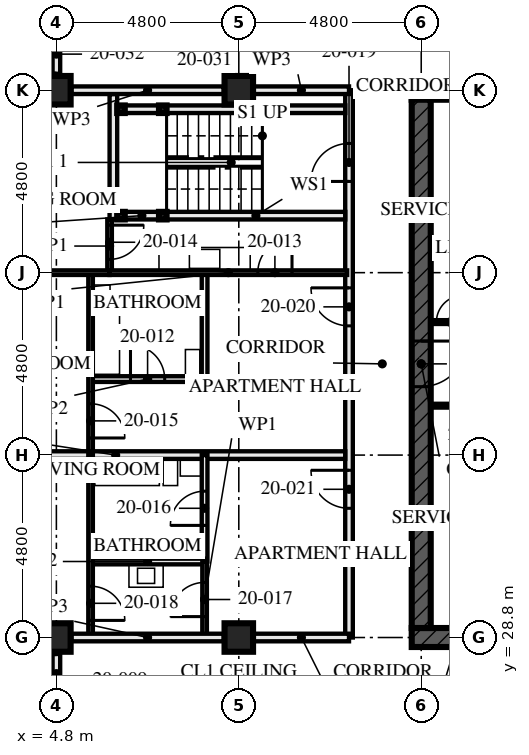
"""IFC4 building model, lengths in metres.
Left out: names, types, materials, properties, quantities, classifications, styles, units other than length and angle.
Written with IfcOpenShell. Run it as: python <this file> out.ifc"""

import sys

from ifc_helpers import new_model, si_unit, direction, frame, frame_2d, origin, origin_2d, place, context, subcontext, project, spatial, rectangle, hollow_rectangle, extrude, element, fill, save


model = new_model("IFC4")
c1 = context("Model", 3, precision=1e-05, world=origin(), true_north=direction((0.0, 1.0)))
c2 = subcontext(c1, "Body", "Model", "MODEL_VIEW")
j1 = project(units=[si_unit("LENGTHUNIT", "METRE"), si_unit("PLANEANGLEUNIT", "RADIAN")], contexts=[c1])
p1 = place(None, origin())
s1 = spatial("IfcSite", under=j1, at=p1, CompositionType="ELEMENT")
p2 = place(p1, origin())
s2 = spatial("IfcBuilding", under=s1, at=p2, CompositionType="ELEMENT")
p3 = place(p2, frame((0.0, 0.0, 76.0)))
s3 = spatial("IfcBuildingStorey", under=s2, at=p3, CompositionType="ELEMENT", Elevation=76.0)
for number, where, z_axis, x_axis in (
    (1, (4.8, 28.8, 0.0), (0.0, 0.0, 1.0), (0.0, 1.0, 0.0)),
    (2, (4.8, 43.2, 0.0), (0.0, 0.0, 1.0), (0.0, 1.0, 0.0)),
    (3, (9.6, 28.8, 0.0), (0.0, 0.0, 1.0), (0.0, 1.0, 0.0)),
    (4, (9.6, 43.2, 0.0), (0.0, 0.0, 1.0), (0.0, 1.0, 0.0)),
):
    element("IfcColumn", number, at=place(p3, frame(where, z_axis=z_axis, x_axis=x_axis)), inside=s3, PredefinedType="COLUMN", context=c2, shape_type="SweptSolid", body=[
        extrude(hollow_rectangle(XDim=0.75, YDim=0.75, WallThickness=0.08, at=origin_2d()), origin(), (0.0, 0.0, 1.0), 3.5),
    ])
p4 = place(p3, frame((14.15, 28.8, -0.17), z_axis=(0.0, 0.0, 1.0), x_axis=(1.0, 0.0, 0.0)))
e5 = element("IfcWall", 5, at=p4, inside=s3, PredefinedType="SHEAR", context=c2, shape_type="SweptSolid", body=[
    extrude(rectangle(XDim=14.9, YDim=0.5, at=frame_2d((7.45, 0.0))), origin(), (0.0, 0.0, 1.0), 3.42),
])
p5 = place(p4, frame((6.85, 0.0, 0.17)))
e6 = element("IfcOpeningElement", 6, at=p5, cuts=e5, PredefinedType="OPENING", context=c2, shape_type="SweptSolid", body=[
    extrude(rectangle(XDim=1.2, YDim=2.1, at=frame_2d((0.6, 1.05))), frame((0.0, 0.26, 0.0), z_axis=(0.0, -1.0, 0.0), x_axis=(1.0, 0.0, 0.0)), (0.0, 0.0, 1.0), 0.521),
])
p6 = place(p3, frame((29.05, 43.2, -0.17), z_axis=(0.0, 0.0, 1.0), x_axis=(-1.0, 0.0, 0.0)))
e7 = element("IfcWall", 7, at=p6, inside=s3, PredefinedType="SHEAR", context=c2, shape_type="SweptSolid", body=[
    extrude(rectangle(XDim=14.9, YDim=0.5, at=frame_2d((7.45, 0.0))), origin(), (0.0, 0.0, 1.0), 3.42),
])
p7 = place(p6, frame((6.85, 0.0, 0.17)))
e8 = element("IfcOpeningElement", 8, at=p7, cuts=e7, PredefinedType="OPENING", context=c2, shape_type="SweptSolid", body=[
    extrude(rectangle(XDim=1.2, YDim=2.1, at=frame_2d((0.6, 1.05))), frame((0.0, 0.26, 0.0), z_axis=(0.0, -1.0, 0.0), x_axis=(1.0, 0.0, 0.0)), (0.0, 0.0, 1.0), 0.521),
])
p8 = place(p3, frame((14.4, 42.95, -0.17), z_axis=(0.0, 0.0, 1.0), x_axis=(0.0, -1.0, 0.0)))
e9 = element("IfcWall", 9, at=p8, inside=s3, PredefinedType="SHEAR", context=c2, shape_type="SweptSolid", body=[
    extrude(rectangle(XDim=13.9, YDim=0.5, at=frame_2d((6.95, 0.0))), origin(), (0.0, 0.0, 1.0), 3.42),
])
p9 = place(p8, frame((6.35, 0.0, 0.17)))
e10 = element("IfcOpeningElement", 10, at=p9, cuts=e9, PredefinedType="OPENING", context=c2, shape_type="SweptSolid", body=[
    extrude(rectangle(XDim=1.2, YDim=2.1, at=frame_2d((0.6, 1.05))), frame((0.0, 0.26, 0.0), z_axis=(0.0, -1.0, 0.0), x_axis=(1.0, 0.0, 0.0)), (0.0, 0.0, 1.0), 0.521),
])
for number, where, z_axis, x_axis in (
    (11, (6.5, 42.7, 0.0), (0.0, 0.0, 1.0), (1.0, 0.0, 0.0)),
    (12, (6.5, 39.9, 0.0), (0.0, 0.0, 1.0), (1.0, 0.0, 0.0)),
    (13, (7.6, 42.7, 0.0), (0.0, 0.0, 1.0), (1.0, 0.0, 0.0)),
    (14, (7.6, 39.9, 0.0), (0.0, 0.0, 1.0), (1.0, 0.0, 0.0)),
):
    element("IfcColumn", number, at=place(p3, frame(where, z_axis=z_axis, x_axis=x_axis)), inside=s3, PredefinedType="COLUMN", context=c2, shape_type="SweptSolid", body=[
        extrude(hollow_rectangle(XDim=0.2, YDim=0.2, WallThickness=0.008, at=origin_2d()), origin(), (0.0, 0.0, 1.0), 3.25),
    ])
p10 = place(p3, frame((4.8, 26.8, 0.0), z_axis=(0.0, 0.0, 1.0), x_axis=(0.0, 1.0, 0.0)))
e15 = element("IfcWall", 15, at=p10, inside=s3, PredefinedType="PARTITIONING", context=c2, shape_type="SweptSolid", body=[
    extrude(rectangle(XDim=1.605, YDim=0.2, at=frame_2d((0.802, 0.0))), origin(), (0.0, 0.0, 1.0), 3.25),
])
p11 = place(p10, frame((0.55, 0.0, 0.0)))
e16 = element("IfcOpeningElement", 16, at=p11, cuts=e15, PredefinedType="OPENING", context=c2, shape_type="SweptSolid", body=[
    extrude(rectangle(XDim=1.0, YDim=2.1, at=frame_2d((0.5, 1.05))), frame((0.0, 0.111, 0.0), z_axis=(0.0, -1.0, 0.0), x_axis=(1.0, 0.0, 0.0)), (0.0, 0.0, 1.0), 0.221),
])
p12 = place(p3, frame((6.6, 42.7, 0.0), z_axis=(0.0, 0.0, 1.0), x_axis=(1.0, 0.0, 0.0)))
e17 = element("IfcWall", 17, at=p12, inside=s3, PredefinedType="SOLIDWALL", context=c2, shape_type="SweptSolid", body=[
    extrude(rectangle(XDim=0.9, YDim=0.2, at=frame_2d((0.45, 0.0))), origin(), (0.0, 0.0, 1.0), 2.94),
])
p13 = place(p3, frame((7.7, 42.7, 0.0), z_axis=(0.0, 0.0, 1.0), x_axis=(1.0, 0.0, 0.0)))
e18 = element("IfcWall", 18, at=p13, inside=s3, PredefinedType="SOLIDWALL", context=c2, shape_type="SweptSolid", body=[
    extrude(rectangle(XDim=4.7, YDim=0.2, at=frame_2d((2.35, 0.0))), origin(), (0.0, 0.0, 1.0), 2.94),
])
p14 = place(p3, frame((6.6, 39.9, 0.0), z_axis=(0.0, 0.0, 1.0), x_axis=(1.0, 0.0, 0.0)))
e19 = element("IfcWall", 19, at=p14, inside=s3, PredefinedType="SOLIDWALL", context=c2, shape_type="SweptSolid", body=[
    extrude(rectangle(XDim=0.9, YDim=0.2, at=frame_2d((0.45, 0.0))), origin(), (0.0, 0.0, 1.0), 2.94),
])
p15 = place(p3, frame((7.7, 39.9, 0.0), z_axis=(0.0, 0.0, 1.0), x_axis=(1.0, 0.0, 0.0)))
e20 = element("IfcWall", 20, at=p15, inside=s3, PredefinedType="SOLIDWALL", context=c2, shape_type="SweptSolid", body=[
    extrude(rectangle(XDim=4.7, YDim=0.2, at=frame_2d((2.35, 0.0))), origin(), (0.0, 0.0, 1.0), 2.94),
])
p16 = place(p3, frame((6.3, 43.1, 0.0), z_axis=(0.0, 0.0, 1.0), x_axis=(0.0, -1.0, 0.0)))
e21 = element("IfcWall", 21, at=p16, inside=s3, PredefinedType="SOLIDWALL", context=c2, shape_type="SweptSolid", body=[
    extrude(rectangle(XDim=3.3, YDim=0.2, at=frame_2d((1.65, 0.0))), origin(), (0.0, 0.0, 1.0), 3.25),
])
p17 = place(p3, frame((5.7, 35.6, 0.0), z_axis=(0.0, 0.0, 1.0), x_axis=(1.0, 0.0, 0.0)))
e22 = element("IfcWall", 22, at=p17, inside=s3, PredefinedType="PARTITIONING", context=c2, shape_type="SweptSolid", body=[
    extrude(rectangle(XDim=3.0, YDim=0.15, at=frame_2d((1.5, 0.0))), origin(), (0.0, 0.0, 1.0), 3.25),
])
p18 = place(p17, frame((1.05, 0.0, 0.0)))
e23 = element("IfcOpeningElement", 23, at=p18, cuts=e22, PredefinedType="OPENING", context=c2, shape_type="SweptSolid", body=[
    extrude(rectangle(XDim=0.9, YDim=2.1, at=frame_2d((0.45, 1.05))), frame((0.0, 0.085, 0.0), z_axis=(0.0, -1.0, 0.0), x_axis=(1.0, 0.0, 0.0)), (0.0, 0.0, 1.0), 0.171),
])
p19 = place(p3, frame((8.7, 38.4, 0.0), z_axis=(0.0, 0.0, 1.0), x_axis=(0.0, -1.0, 0.0)))
e24 = element("IfcWall", 24, at=p19, inside=s3, PredefinedType="PARTITIONING", context=c2, shape_type="SweptSolid", body=[
    extrude(rectangle(XDim=2.8, YDim=0.15, at=frame_2d((1.4, 0.0))), origin(), (0.0, 0.0, 1.0), 3.25),
])
p20 = place(p3, frame((6.2, 38.4, 0.0), z_axis=(0.0, 0.0, 1.0), x_axis=(1.0, 0.0, 0.0)))
e25 = element("IfcWall", 25, at=p20, inside=s3, PredefinedType="PARTITIONING", context=c2, shape_type="SweptSolid", body=[
    extrude(rectangle(XDim=6.25, YDim=0.12, at=frame_2d((3.125, 0.0))), origin(), (0.0, 0.0, 1.0), 2.04),
])
p21 = place(p20, frame((3.9, 0.0, 0.0)))
e26 = element("IfcOpeningElement", 26, at=p21, cuts=e25, PredefinedType="OPENING", context=c2, shape_type="SweptSolid", body=[
    extrude(rectangle(XDim=0.9, YDim=2.0, at=frame_2d((0.45, 1.0))), frame((0.0, 0.071, 0.0), z_axis=(0.0, -1.0, 0.0), x_axis=(1.0, 0.0, 0.0)), (0.0, 0.0, 1.0), 0.141),
])
p22 = place(p3, frame((6.2, 39.8, 0.0), z_axis=(0.0, 0.0, 1.0), x_axis=(0.0, -1.0, 0.0)))
e27 = element("IfcWall", 27, at=p22, inside=s3, PredefinedType="PARTITIONING", context=c2, shape_type="SweptSolid", body=[
    extrude(rectangle(XDim=1.4, YDim=0.12, at=frame_2d((0.7, 0.0))), origin(), (0.0, 0.0, 1.0), 3.25),
])
p23 = place(p22, frame((0.15, 0.0, 0.0)))
e28 = element("IfcOpeningElement", 28, at=p23, cuts=e27, PredefinedType="OPENING", context=c2, shape_type="SweptSolid", body=[
    extrude(rectangle(XDim=0.9, YDim=2.1, at=frame_2d((0.45, 1.05))), frame((0.0, 0.071, 0.0), z_axis=(0.0, -1.0, 0.0), x_axis=(1.0, 0.0, 0.0)), (0.0, 0.0, 1.0), 0.141),
])
p24 = place(p3, frame((5.7, 38.4, 0.0), z_axis=(0.0, 0.0, 1.0), x_axis=(0.0, -1.0, 0.0)))
e29 = element("IfcWall", 29, at=p24, inside=s3, PredefinedType="PARTITIONING", context=c2, shape_type="SweptSolid", body=[
    extrude(rectangle(XDim=4.8, YDim=0.12, at=frame_2d((2.4, 0.0))), origin(), (0.0, 0.0, 1.0), 3.25),
])
p25 = place(p24, frame((3.45, 0.0, 0.0)))
e30 = element("IfcOpeningElement", 30, at=p25, cuts=e29, PredefinedType="OPENING", context=c2, shape_type="SweptSolid", body=[
    extrude(rectangle(XDim=0.9, YDim=2.1, at=frame_2d((0.45, 1.05))), frame((0.0, 0.071, 0.0), z_axis=(0.0, -1.0, 0.0), x_axis=(1.0, 0.0, 0.0)), (0.0, 0.0, 1.0), 0.141),
])
p26 = place(p3, frame((0.32, 38.4, 0.0), z_axis=(0.0, 0.0, 1.0), x_axis=(1.0, 0.0, 0.0)))
e31 = element("IfcWall", 31, at=p26, inside=s3, PredefinedType="PARTITIONING", context=c2, shape_type="SweptSolid", body=[
    extrude(rectangle(XDim=5.88, YDim=0.12, at=frame_2d((2.94, 0.0))), origin(), (0.0, 0.0, 1.0), 2.04),
])
p27 = place(p3, frame((0.32, 33.6, 0.0), z_axis=(0.0, 0.0, 1.0), x_axis=(1.0, 0.0, 0.0)))
e32 = element("IfcWall", 32, at=p27, inside=s3, PredefinedType="PARTITIONING", context=c2, shape_type="SweptSolid", body=[
    extrude(rectangle(XDim=12.08, YDim=0.2, at=frame_2d((6.04, 0.0))), origin(), (0.0, 0.0, 1.0), 2.04),
])
p28 = place(p3, frame((5.7, 30.8, 0.0), z_axis=(0.0, 0.0, 1.0), x_axis=(1.0, 0.0, 0.0)))
e33 = element("IfcWall", 33, at=p28, inside=s3, PredefinedType="PARTITIONING", context=c2, shape_type="SweptSolid", body=[
    extrude(rectangle(XDim=3.0, YDim=0.15, at=frame_2d((1.5, 0.0))), origin(), (0.0, 0.0, 1.0), 3.25),
])
p29 = place(p3, frame((8.7, 33.6, 0.0), z_axis=(0.0, 0.0, 1.0), x_axis=(0.0, -1.0, 0.0)))
e34 = element("IfcWall", 34, at=p29, inside=s3, PredefinedType="PARTITIONING", context=c2, shape_type="SweptSolid", body=[
    extrude(rectangle(XDim=2.8, YDim=0.15, at=frame_2d((1.4, 0.0))), origin(), (0.0, 0.0, 1.0), 3.25),
])
p30 = place(p29, frame((0.95, 0.0, 0.0)))
e35 = element("IfcOpeningElement", 35, at=p30, cuts=e34, PredefinedType="OPENING", context=c2, shape_type="SweptSolid", body=[
    extrude(rectangle(XDim=0.9, YDim=2.1, at=frame_2d((0.45, 1.05))), frame((0.0, 0.085, 0.0), z_axis=(0.0, -1.0, 0.0), x_axis=(1.0, 0.0, 0.0)), (0.0, 0.0, 1.0), 0.171),
])
p31 = place(p3, frame((8.7, 30.8, 0.0), z_axis=(0.0, 0.0, 1.0), x_axis=(0.0, -1.0, 0.0)))
e36 = element("IfcWall", 36, at=p31, inside=s3, PredefinedType="PARTITIONING", context=c2, shape_type="SweptSolid", body=[
    extrude(rectangle(XDim=2.0, YDim=0.12, at=frame_2d((1.0, 0.0))), origin(), (0.0, 0.0, 1.0), 3.25),
])
p32 = place(p31, frame((0.55, 0.0, 0.0)))
e37 = element("IfcOpeningElement", 37, at=p32, cuts=e36, PredefinedType="OPENING", context=c2, shape_type="SweptSolid", body=[
    extrude(rectangle(XDim=0.9, YDim=2.1, at=frame_2d((0.45, 1.05))), frame((0.0, 0.071, 0.0), z_axis=(0.0, -1.0, 0.0), x_axis=(1.0, 0.0, 0.0)), (0.0, 0.0, 1.0), 0.141),
])
p33 = place(p3, frame((5.7, 33.6, 0.0), z_axis=(0.0, 0.0, 1.0), x_axis=(0.0, -1.0, 0.0)))
e38 = element("IfcWall", 38, at=p33, inside=s3, PredefinedType="PARTITIONING", context=c2, shape_type="SweptSolid", body=[
    extrude(rectangle(XDim=4.8, YDim=0.12, at=frame_2d((2.4, 0.0))), origin(), (0.0, 0.0, 1.0), 3.25),
])
p34 = place(p33, frame((3.45, 0.0, 0.0)))
e39 = element("IfcOpeningElement", 39, at=p34, cuts=e38, PredefinedType="OPENING", context=c2, shape_type="SweptSolid", body=[
    extrude(rectangle(XDim=0.9, YDim=2.1, at=frame_2d((0.45, 1.05))), frame((0.0, 0.071, 0.0), z_axis=(0.0, -1.0, 0.0), x_axis=(1.0, 0.0, 0.0)), (0.0, 0.0, 1.0), 0.141),
])
p35 = place(p3, frame((12.5, 43.2, 0.0), z_axis=(0.0, 0.0, 1.0), x_axis=(0.0, -1.0, 0.0)))
e40 = element("IfcWall", 40, at=p35, inside=s3, PredefinedType="PARTITIONING", context=c2, shape_type="SweptSolid", body=[
    extrude(rectangle(XDim=14.4, YDim=0.2, at=frame_2d((7.2, 0.0))), origin(), (0.0, 0.0, 1.0), 2.04),
])
p36 = place(p35, frame((1.4, 0.0, 0.0)))
e41 = element("IfcOpeningElement", 41, at=p36, cuts=e40, PredefinedType="OPENING", context=c2, shape_type="SweptSolid", body=[
    extrude(rectangle(XDim=1.0, YDim=2.0, at=frame_2d((0.5, 1.0))), frame((0.0, 0.111, 0.0), z_axis=(0.0, -1.0, 0.0), x_axis=(1.0, 0.0, 0.0)), (0.0, 0.0, 1.0), 0.221),
])
p37 = place(p35, frame((5.2, 0.0, 0.0)))
e42 = element("IfcOpeningElement", 42, at=p37, cuts=e40, PredefinedType="OPENING", context=c2, shape_type="SweptSolid", body=[
    extrude(rectangle(XDim=1.0, YDim=2.0, at=frame_2d((0.5, 1.0))), frame((0.0, 0.111, 0.0), z_axis=(0.0, -1.0, 0.0), x_axis=(1.0, 0.0, 0.0)), (0.0, 0.0, 1.0), 0.221),
])
p38 = place(p35, frame((10.0, 0.0, 0.0)))
e43 = element("IfcOpeningElement", 43, at=p38, cuts=e40, PredefinedType="OPENING", context=c2, shape_type="SweptSolid", body=[
    extrude(rectangle(XDim=1.0, YDim=2.0, at=frame_2d((0.5, 1.0))), frame((0.0, 0.111, 0.0), z_axis=(0.0, -1.0, 0.0), x_axis=(1.0, 0.0, 0.0)), (0.0, 0.0, 1.0), 0.221),
])
p39 = place(p3, frame((4.8, 45.2, 0.0), z_axis=(0.0, 0.0, 1.0), x_axis=(0.0, -1.0, 0.0)))
e44 = element("IfcWall", 44, at=p39, inside=s3, PredefinedType="PARTITIONING", context=c2, shape_type="SweptSolid", body=[
    extrude(rectangle(XDim=1.605, YDim=0.2, at=frame_2d((0.802, 0.0))), origin(), (0.0, 0.0, 1.0), 3.25),
])
p40 = place(p39, frame((0.55, 0.0, 0.0)))
e45 = element("IfcOpeningElement", 45, at=p40, cuts=e44, PredefinedType="OPENING", context=c2, shape_type="SweptSolid", body=[
    extrude(rectangle(XDim=1.0, YDim=2.1, at=frame_2d((0.5, 1.05))), frame((0.0, 0.111, 0.0), z_axis=(0.0, -1.0, 0.0), x_axis=(1.0, 0.0, 0.0)), (0.0, 0.0, 1.0), 0.221),
])
p41 = place(p3, frame((14.65, 34.9, 0.0), z_axis=(0.0, 0.0, 1.0), x_axis=(1.0, 0.0, 0.0)))
e46 = element("IfcWall", 46, at=p41, inside=s3, PredefinedType="SOLIDWALL", context=c2, shape_type="SweptSolid", body=[
    extrude(rectangle(XDim=5.9, YDim=0.1, at=frame_2d((2.95, 0.0))), origin(), (0.0, 0.0, 1.0), 3.25),
])
p42 = place(p41, frame((1.6, 0.0, 0.0)))
e47 = element("IfcOpeningElement", 47, at=p42, cuts=e46, PredefinedType="OPENING", context=c2, shape_type="SweptSolid", body=[
    extrude(rectangle(XDim=0.7, YDim=2.1, at=frame_2d((0.35, 1.05))), frame((0.0, 0.061, 0.0), z_axis=(0.0, -1.0, 0.0), x_axis=(1.0, 0.0, 0.0)), (0.0, 0.0, 1.0), 0.121),
])
p43 = place(p3, frame((14.65, 37.1, 0.0), z_axis=(0.0, 0.0, 1.0), x_axis=(1.0, 0.0, 0.0)))
e48 = element("IfcWall", 48, at=p43, inside=s3, PredefinedType="SOLIDWALL", context=c2, shape_type="SweptSolid", body=[
    extrude(rectangle(XDim=5.9, YDim=0.1, at=frame_2d((2.95, 0.0))), origin(), (0.0, 0.0, 1.0), 3.25),
])
p44 = place(p43, frame((0.15, 0.0, 0.0)))
e49 = element("IfcOpeningElement", 49, at=p44, cuts=e48, PredefinedType="OPENING", context=c2, shape_type="SweptSolid", body=[
    extrude(rectangle(XDim=0.7, YDim=2.1, at=frame_2d((0.35, 1.05))), frame((0.0, 0.061, 0.0), z_axis=(0.0, -1.0, 0.0), x_axis=(1.0, 0.0, 0.0)), (0.0, 0.0, 1.0), 0.121),
])
p45 = place(p43, frame((1.5, 0.0, 0.0)))
e50 = element("IfcOpeningElement", 50, at=p45, cuts=e48, PredefinedType="OPENING", context=c2, shape_type="SweptSolid", body=[
    extrude(rectangle(XDim=0.9, YDim=2.1, at=frame_2d((0.45, 1.05))), frame((0.0, 0.061, 0.0), z_axis=(0.0, -1.0, 0.0), x_axis=(1.0, 0.0, 0.0)), (0.0, 0.0, 1.0), 0.121),
])
p46 = place(p3, frame((12.5, 28.8, 0.0), z_axis=(0.0, 0.0, 1.0), x_axis=(-1.0, 0.0, 0.0)))
e51 = element("IfcWall", 51, at=p46, inside=s3, PredefinedType="PARTITIONING", context=c2, shape_type="SweptSolid", body=[
    extrude(rectangle(XDim=2.505, YDim=0.2, at=frame_2d((1.252, 0.0))), origin(), (0.0, 0.0, 1.0), 2.04),
])
p47 = place(p3, frame((9.205, 28.8, 0.0), z_axis=(0.0, 0.0, 1.0), x_axis=(-1.0, 0.0, 0.0)))
e52 = element("IfcWall", 52, at=p47, inside=s3, PredefinedType="PARTITIONING", context=c2, shape_type="SweptSolid", body=[
    extrude(rectangle(XDim=4.01, YDim=0.2, at=frame_2d((2.005, 0.0))), origin(), (0.0, 0.0, 1.0), 2.04),
])
p48 = place(p3, frame((12.5, 43.2, 0.0), z_axis=(0.0, 0.0, 1.0), x_axis=(-1.0, 0.0, 0.0)))
e53 = element("IfcWall", 53, at=p48, inside=s3, PredefinedType="PARTITIONING", context=c2, shape_type="SweptSolid", body=[
    extrude(rectangle(XDim=2.505, YDim=0.2, at=frame_2d((1.252, 0.0))), origin(), (0.0, 0.0, 1.0), 2.04),
])
p49 = place(p3, frame((9.205, 43.2, 0.0), z_axis=(0.0, 0.0, 1.0), x_axis=(-1.0, 0.0, 0.0)))
e54 = element("IfcWall", 54, at=p49, inside=s3, PredefinedType="PARTITIONING", context=c2, shape_type="SweptSolid", body=[
    extrude(rectangle(XDim=4.01, YDim=0.2, at=frame_2d((2.005, 0.0))), origin(), (0.0, 0.0, 1.0), 2.04),
])
p50 = place(p11, origin())
e55 = element("IfcDoor", 55, at=p50, inside=s3, OperationType="SINGLE_SWING_LEFT", PredefinedType="DOOR", context=c2, shape_type="SweptSolid", body=[
    extrude(rectangle(XDim=1.0, YDim=2.1, at=frame_2d((0.5, 1.05))), frame((0.0, 0.027, 0.0), z_axis=(0.0, -1.0, 0.0), x_axis=(1.0, 0.0, 0.0)), (0.0, 0.0, 1.0), 0.054),
])
fill(e16, e55)
p51 = place(p18, origin())
e56 = element("IfcDoor", 56, at=p51, inside=s3, OperationType="SINGLE_SWING_RIGHT", PredefinedType="DOOR", context=c2, shape_type="SweptSolid", body=[
    extrude(rectangle(XDim=0.9, YDim=2.1, at=frame_2d((0.45, 1.05))), frame((0.0, 0.022, 0.0), z_axis=(0.0, -1.0, 0.0), x_axis=(1.0, 0.0, 0.0)), (0.0, 0.0, 1.0), 0.044),
])
fill(e23, e56)
p52 = place(p21, origin())
e57 = element("IfcDoor", 57, at=p52, inside=s3, OperationType="SINGLE_SWING_LEFT", PredefinedType="DOOR", context=c2, shape_type="SweptSolid", body=[
    extrude(rectangle(XDim=0.9, YDim=2.0, at=frame_2d((0.45, 1.0))), frame((0.0, 0.022, 0.0), z_axis=(0.0, -1.0, 0.0), x_axis=(1.0, 0.0, 0.0)), (0.0, 0.0, 1.0), 0.044),
])
fill(e26, e57)
p53 = place(p23, origin())
e58 = element("IfcDoor", 58, at=p53, inside=s3, OperationType="SINGLE_SWING_RIGHT", PredefinedType="DOOR", context=c2, shape_type="SweptSolid", body=[
    extrude(rectangle(XDim=0.9, YDim=2.1, at=frame_2d((0.45, 1.05))), frame((0.0, 0.022, 0.0), z_axis=(0.0, -1.0, 0.0), x_axis=(1.0, 0.0, 0.0)), (0.0, 0.0, 1.0), 0.044),
])
fill(e28, e58)
p54 = place(p25, origin())
e59 = element("IfcDoor", 59, at=p54, inside=s3, OperationType="SINGLE_SWING_LEFT", PredefinedType="DOOR", context=c2, shape_type="SweptSolid", body=[
    extrude(rectangle(XDim=0.9, YDim=2.1, at=frame_2d((0.45, 1.05))), frame((0.0, 0.022, 0.0), z_axis=(0.0, -1.0, 0.0), x_axis=(1.0, 0.0, 0.0)), (0.0, 0.0, 1.0), 0.044),
])
fill(e30, e59)
p55 = place(p30, frame((0.9, 0.0, 0.0), z_axis=(0.0, 0.0, 1.0), x_axis=(-1.0, 0.0, 0.0)))
e60 = element("IfcDoor", 60, at=p55, inside=s3, OperationType="SINGLE_SWING_RIGHT", PredefinedType="DOOR", context=c2, shape_type="SweptSolid", body=[
    extrude(rectangle(XDim=0.9, YDim=2.1, at=frame_2d((0.45, 1.05))), frame((0.0, 0.022, 0.0), z_axis=(0.0, -1.0, 0.0), x_axis=(1.0, 0.0, 0.0)), (0.0, 0.0, 1.0), 0.044),
])
fill(e35, e60)
p56 = place(p32, frame((0.9, 0.0, 0.0), z_axis=(0.0, 0.0, 1.0), x_axis=(-1.0, 0.0, 0.0)))
e61 = element("IfcDoor", 61, at=p56, inside=s3, OperationType="SINGLE_SWING_RIGHT", PredefinedType="DOOR", context=c2, shape_type="SweptSolid", body=[
    extrude(rectangle(XDim=0.9, YDim=2.1, at=frame_2d((0.45, 1.05))), frame((0.0, 0.022, 0.0), z_axis=(0.0, -1.0, 0.0), x_axis=(1.0, 0.0, 0.0)), (0.0, 0.0, 1.0), 0.044),
])
fill(e37, e61)
p57 = place(p34, origin())
e62 = element("IfcDoor", 62, at=p57, inside=s3, OperationType="SINGLE_SWING_LEFT", PredefinedType="DOOR", context=c2, shape_type="SweptSolid", body=[
    extrude(rectangle(XDim=0.9, YDim=2.1, at=frame_2d((0.45, 1.05))), frame((0.0, 0.022, 0.0), z_axis=(0.0, -1.0, 0.0), x_axis=(1.0, 0.0, 0.0)), (0.0, 0.0, 1.0), 0.044),
])
fill(e39, e62)
p58 = place(p36, frame((1.0, 0.0, 0.0), z_axis=(0.0, 0.0, 1.0), x_axis=(-1.0, 0.0, 0.0)))
e63 = element("IfcDoor", 63, at=p58, inside=s3, OperationType="SINGLE_SWING_RIGHT", PredefinedType="DOOR", context=c2, shape_type="SweptSolid", body=[
    extrude(rectangle(XDim=1.0, YDim=2.0, at=frame_2d((0.5, 1.0))), frame((0.0, 0.032, 0.0), z_axis=(0.0, -1.0, 0.0), x_axis=(1.0, 0.0, 0.0)), (0.0, 0.0, 1.0), 0.064),
])
fill(e41, e63)
p59 = place(p37, frame((1.0, 0.0, 0.0), z_axis=(0.0, 0.0, 1.0), x_axis=(-1.0, 0.0, 0.0)))
e64 = element("IfcDoor", 64, at=p59, inside=s3, OperationType="SINGLE_SWING_LEFT", PredefinedType="DOOR", context=c2, shape_type="SweptSolid", body=[
    extrude(rectangle(XDim=1.0, YDim=2.0, at=frame_2d((0.5, 1.0))), frame((0.0, 0.027, 0.0), z_axis=(0.0, -1.0, 0.0), x_axis=(1.0, 0.0, 0.0)), (0.0, 0.0, 1.0), 0.054),
])
fill(e42, e64)
p60 = place(p38, frame((1.0, 0.0, 0.0), z_axis=(0.0, 0.0, 1.0), x_axis=(-1.0, 0.0, 0.0)))
e65 = element("IfcDoor", 65, at=p60, inside=s3, OperationType="SINGLE_SWING_LEFT", PredefinedType="DOOR", context=c2, shape_type="SweptSolid", body=[
    extrude(rectangle(XDim=1.0, YDim=2.0, at=frame_2d((0.5, 1.0))), frame((0.0, 0.027, 0.0), z_axis=(0.0, -1.0, 0.0), x_axis=(1.0, 0.0, 0.0)), (0.0, 0.0, 1.0), 0.054),
])
fill(e43, e65)
p61 = place(p40, frame((1.0, 0.0, 0.0), z_axis=(0.0, 0.0, 1.0), x_axis=(-1.0, 0.0, 0.0)))
e66 = element("IfcDoor", 66, at=p61, inside=s3, OperationType="SINGLE_SWING_RIGHT", PredefinedType="DOOR", context=c2, shape_type="SweptSolid", body=[
    extrude(rectangle(XDim=1.0, YDim=2.1, at=frame_2d((0.5, 1.05))), frame((0.0, 0.027, 0.0), z_axis=(0.0, -1.0, 0.0), x_axis=(1.0, 0.0, 0.0)), (0.0, 0.0, 1.0), 0.054),
])
fill(e45, e66)
p62 = place(p44, origin())
e67 = element("IfcDoor", 67, at=p62, inside=s3, OperationType="SINGLE_SWING_LEFT", PredefinedType="DOOR", context=c2, shape_type="SweptSolid", body=[
    extrude(rectangle(XDim=0.7, YDim=2.1, at=frame_2d((0.35, 1.05))), frame((0.0, 0.027, 0.0), z_axis=(0.0, -1.0, 0.0), x_axis=(1.0, 0.0, 0.0)), (0.0, 0.0, 1.0), 0.054),
])
fill(e49, e67)
p63 = place(p9, origin())
e68 = element("IfcDoor", 68, at=p63, inside=s3, OperationType="SINGLE_SWING_LEFT", PredefinedType="DOOR", context=c2, shape_type="SweptSolid", body=[
    extrude(rectangle(XDim=1.2, YDim=2.1, at=frame_2d((0.6, 1.05))), frame((0.0, 0.027, 0.0), z_axis=(0.0, -1.0, 0.0), x_axis=(1.0, 0.0, 0.0)), (0.0, 0.0, 1.0), 0.054),
])
fill(e10, e68)
save(model, sys.argv[1])
